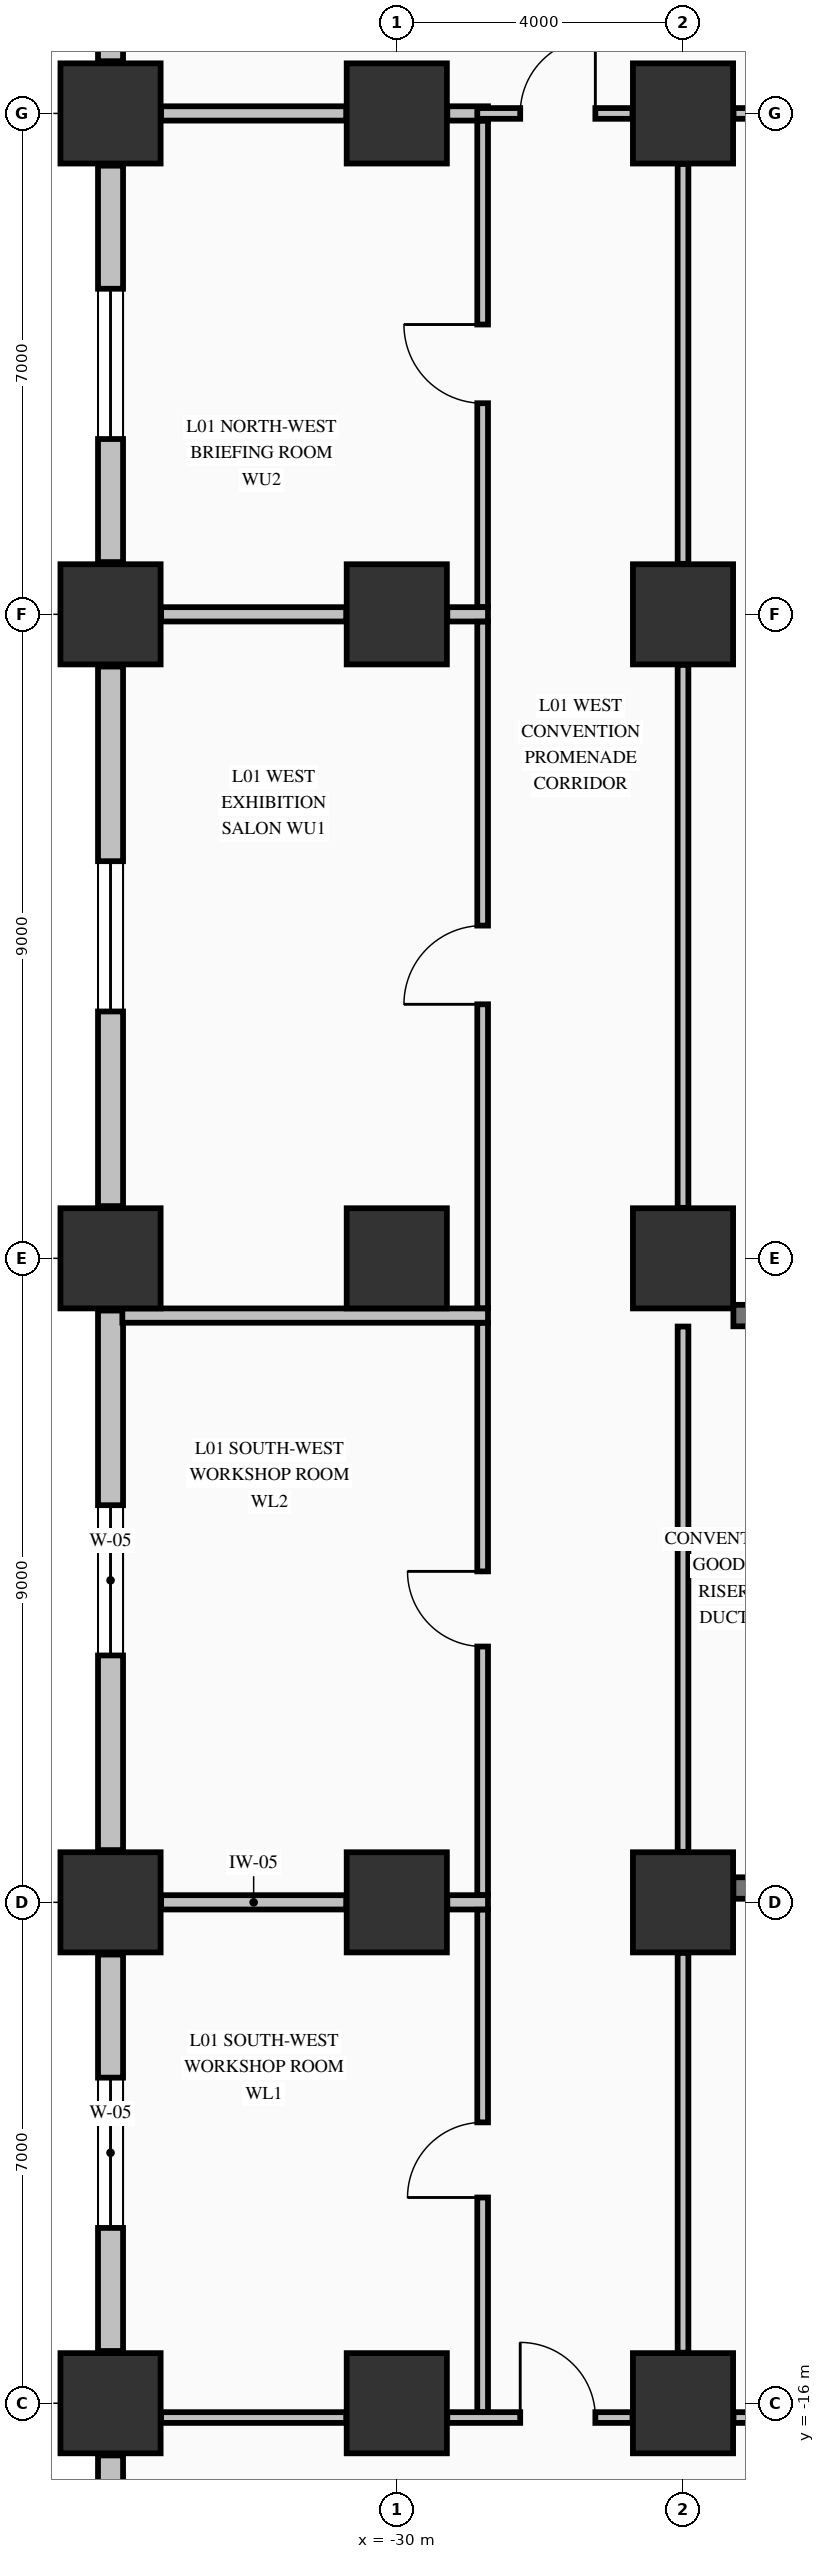
"""IFC4 building model, lengths in metres.
Left out: names, types, materials, properties, quantities, classifications, styles, units other than length and angle.
Written with IfcOpenShell. Run it as: python <this file> out.ifc"""

import sys

from ifc_helpers import new_model, si_unit, direction, frame, frame_2d, origin, origin_2d, place, context, subcontext, project, spatial, rectangle, extrude, element, fill, save


model = new_model("IFC4")
c1 = context("Model", 3, precision=1e-05, world=origin(), true_north=direction((0.0, 1.0)))
c2 = subcontext(c1, "Body", "Model", "MODEL_VIEW")
j1 = project(units=[si_unit("LENGTHUNIT", "METRE"), si_unit("PLANEANGLEUNIT", "RADIAN")], contexts=[c1])
p1 = place(None, origin())
s1 = spatial("IfcSite", under=j1, at=p1, CompositionType="ELEMENT")
p2 = place(p1, origin())
s2 = spatial("IfcBuilding", under=s1, at=p2, CompositionType="ELEMENT")
p3 = place(p2, frame((0.0, 0.0, 5.44)))
s3 = spatial("IfcBuildingStorey", under=s2, at=p3, CompositionType="ELEMENT", Elevation=5.44)
for number, where, z_axis, x_axis in (
    (1, (-34.0, -16.0, 0.0), (0.0, 0.0, 1.0), (1.0, 0.0, 0.0)),
    (2, (-34.0, -9.0, 0.0), (0.0, 0.0, 1.0), (1.0, 0.0, 0.0)),
    (3, (-34.0, 0.0, 0.0), (0.0, 0.0, 1.0), (1.0, 0.0, 0.0)),
    (4, (-34.0, 9.0, 0.0), (0.0, 0.0, 1.0), (1.0, 0.0, 0.0)),
    (5, (-34.0, 16.0, 0.0), (0.0, 0.0, 1.0), (1.0, 0.0, 0.0)),
    (6, (-30.0, -16.0, 0.0), (0.0, 0.0, 1.0), (1.0, 0.0, 0.0)),
    (7, (-30.0, -9.0, 0.0), (0.0, 0.0, 1.0), (1.0, 0.0, 0.0)),
    (8, (-30.0, 0.0, 0.0), (0.0, 0.0, 1.0), (1.0, 0.0, 0.0)),
    (9, (-30.0, 9.0, 0.0), (0.0, 0.0, 1.0), (1.0, 0.0, 0.0)),
    (10, (-30.0, 16.0, 0.0), (0.0, 0.0, 1.0), (1.0, 0.0, 0.0)),
    (11, (-26.0, -16.0, 0.0), (0.0, 0.0, 1.0), (1.0, 0.0, 0.0)),
    (12, (-26.0, -9.0, 0.0), (0.0, 0.0, 1.0), (1.0, 0.0, 0.0)),
    (13, (-26.0, 0.0, 0.0), (0.0, 0.0, 1.0), (1.0, 0.0, 0.0)),
    (14, (-26.0, 9.0, 0.0), (0.0, 0.0, 1.0), (1.0, 0.0, 0.0)),
    (15, (-26.0, 16.0, 0.0), (0.0, 0.0, 1.0), (1.0, 0.0, 0.0)),
):
    element("IfcColumn", number, at=place(p3, frame(where, z_axis=z_axis, x_axis=x_axis)), inside=s3, PredefinedType="COLUMN", context=c2, shape_type="SweptSolid", body=[
        extrude(rectangle(XDim=1.4, YDim=1.4, at=origin_2d()), origin(), (0.0, 0.0, 1.0), 5.09),
    ])
p4 = place(p3, frame((-34.0, -21.27, 0.0), z_axis=(0.0, 0.0, 1.0), x_axis=(0.0, 1.0, 0.0)))
e16 = element("IfcWall", 16, at=p4, inside=s3, PredefinedType="STANDARD", context=c2, shape_type="SweptSolid", body=[
    extrude(rectangle(XDim=4.54, YDim=0.35, at=frame_2d((2.27, 0.0))), origin(), (0.0, 0.0, 1.0), 5.09),
])
p5 = place(p3, frame((-34.0, -15.27, 0.0), z_axis=(0.0, 0.0, 1.0), x_axis=(0.0, 1.0, 0.0)))
e17 = element("IfcWall", 17, at=p5, inside=s3, PredefinedType="STANDARD", context=c2, shape_type="SweptSolid", body=[
    extrude(rectangle(XDim=5.54, YDim=0.35, at=frame_2d((2.77, 0.0))), origin(), (0.0, 0.0, 1.0), 4.482),
])
p6 = place(p5, frame((1.72, 0.0, 0.75)))
e18 = element("IfcOpeningElement", 18, at=p6, cuts=e17, PredefinedType="OPENING", context=c2, shape_type="SweptSolid", body=[
    extrude(rectangle(XDim=2.1, YDim=1.75, at=frame_2d((1.05, 0.875))), frame((0.0, 0.185, 0.0), z_axis=(0.0, -1.0, 0.0), x_axis=(1.0, 0.0, 0.0)), (0.0, 0.0, 1.0), 0.37),
])
p7 = place(p3, frame((-34.0, -8.27, 0.0), z_axis=(0.0, 0.0, 1.0), x_axis=(0.0, 1.0, 0.0)))
e19 = element("IfcWall", 19, at=p7, inside=s3, PredefinedType="STANDARD", context=c2, shape_type="SweptSolid", body=[
    extrude(rectangle(XDim=7.54, YDim=0.35, at=frame_2d((3.77, 0.0))), origin(), (0.0, 0.0, 1.0), 4.482),
])
p8 = place(p7, frame((2.72, 0.0, 0.75)))
e20 = element("IfcOpeningElement", 20, at=p8, cuts=e19, PredefinedType="OPENING", context=c2, shape_type="SweptSolid", body=[
    extrude(rectangle(XDim=2.1, YDim=1.75, at=frame_2d((1.05, 0.875))), frame((0.0, 0.185, 0.0), z_axis=(0.0, -1.0, 0.0), x_axis=(1.0, 0.0, 0.0)), (0.0, 0.0, 1.0), 0.37),
])
p9 = place(p3, frame((-34.0, 0.73, 0.0), z_axis=(0.0, 0.0, 1.0), x_axis=(0.0, 1.0, 0.0)))
e21 = element("IfcWall", 21, at=p9, inside=s3, PredefinedType="STANDARD", context=c2, shape_type="SweptSolid", body=[
    extrude(rectangle(XDim=7.54, YDim=0.35, at=frame_2d((3.77, 0.0))), origin(), (0.0, 0.0, 1.0), 4.482),
])
p10 = place(p9, frame((2.72, 0.0, 0.75)))
e22 = element("IfcOpeningElement", 22, at=p10, cuts=e21, PredefinedType="OPENING", context=c2, shape_type="SweptSolid", body=[
    extrude(rectangle(XDim=2.1, YDim=1.75, at=frame_2d((1.05, 0.875))), frame((0.0, 0.185, 0.0), z_axis=(0.0, -1.0, 0.0), x_axis=(1.0, 0.0, 0.0)), (0.0, 0.0, 1.0), 0.37),
])
p11 = place(p3, frame((-34.0, 9.73, 0.0), z_axis=(0.0, 0.0, 1.0), x_axis=(0.0, 1.0, 0.0)))
e23 = element("IfcWall", 23, at=p11, inside=s3, PredefinedType="STANDARD", context=c2, shape_type="SweptSolid", body=[
    extrude(rectangle(XDim=5.54, YDim=0.35, at=frame_2d((2.77, 0.0))), origin(), (0.0, 0.0, 1.0), 4.482),
])
p12 = place(p11, frame((1.72, 0.0, 0.75)))
e24 = element("IfcOpeningElement", 24, at=p12, cuts=e23, PredefinedType="OPENING", context=c2, shape_type="SweptSolid", body=[
    extrude(rectangle(XDim=2.1, YDim=1.75, at=frame_2d((1.05, 0.875))), frame((0.0, 0.185, 0.0), z_axis=(0.0, -1.0, 0.0), x_axis=(1.0, 0.0, 0.0)), (0.0, 0.0, 1.0), 0.37),
])
p13 = place(p3, frame((-34.0, 16.73, 0.0), z_axis=(0.0, 0.0, 1.0), x_axis=(0.0, 1.0, 0.0)))
e25 = element("IfcWall", 25, at=p13, inside=s3, PredefinedType="STANDARD", context=c2, shape_type="SweptSolid", body=[
    extrude(rectangle(XDim=4.54, YDim=0.35, at=frame_2d((2.27, 0.0))), origin(), (0.0, 0.0, 1.0), 4.482),
])
for number, where, z_axis, x_axis in (
    (26, (-25.296, -8.8, 0.0), (0.0, 0.0, 1.0), (1.0, 0.0, 0.0)),
    (27, (-25.296, -0.8, 0.0), (0.0, 0.0, 1.0), (1.0, 0.0, 0.0)),
):
    element("IfcWall", number, at=place(p3, frame(where, z_axis=z_axis, x_axis=x_axis)), inside=s3, PredefinedType="SHEAR", context=c2, shape_type="SweptSolid", body=[
        extrude(rectangle(XDim=3.046, YDim=0.3, at=frame_2d((1.523, 0.0))), origin(), (0.0, 0.0, 1.0), 5.09),
    ])
p14 = place(p3, frame((-33.294, -16.2, 0.0), z_axis=(0.0, 0.0, 1.0), x_axis=(1.0, 0.0, 0.0)))
e28 = element("IfcWall", 28, at=p14, inside=s3, PredefinedType="PARTITIONING", context=c2, shape_type="SweptSolid", body=[
    extrude(rectangle(XDim=2.588, YDim=0.15, at=frame_2d((1.294, 0.0))), origin(), (0.0, 0.0, 1.0), 4.132),
])
p15 = place(p3, frame((-29.294, -16.2, 0.0), z_axis=(0.0, 0.0, 1.0), x_axis=(1.0, 0.0, 0.0)))
e29 = element("IfcWall", 29, at=p15, inside=s3, PredefinedType="PARTITIONING", context=c2, shape_type="SweptSolid", body=[
    extrude(rectangle(XDim=2.588, YDim=0.15, at=frame_2d((1.294, 0.0))), origin(), (0.0, 0.0, 1.0), 4.132),
])
p16 = place(p15, frame((1.019, 0.0, 0.0)))
e30 = element("IfcOpeningElement", 30, at=p16, cuts=e29, PredefinedType="OPENING", context=c2, shape_type="SweptSolid", body=[
    extrude(rectangle(XDim=1.05, YDim=2.15, at=frame_2d((0.525, 1.075))), frame((0.0, 0.085, 0.0), z_axis=(0.0, -1.0, 0.0), x_axis=(1.0, 0.0, 0.0)), (0.0, 0.0, 1.0), 0.17),
])
p17 = place(p3, frame((-25.294, -16.2, 0.0), z_axis=(0.0, 0.0, 1.0), x_axis=(1.0, 0.0, 0.0)))
e31 = element("IfcWall", 31, at=p17, inside=s3, PredefinedType="PARTITIONING", context=c2, shape_type="SweptSolid", body=[
    extrude(rectangle(XDim=4.488, YDim=0.15, at=frame_2d((2.244, 0.0))), origin(), (0.0, 0.0, 1.0), 4.132),
])
p18 = place(p17, frame((0.619, 0.0, 0.0)))
e32 = element("IfcOpeningElement", 32, at=p18, cuts=e31, PredefinedType="OPENING", context=c2, shape_type="SweptSolid", body=[
    extrude(rectangle(XDim=0.95, YDim=2.15, at=frame_2d((0.475, 1.075))), frame((0.0, 0.085, 0.0), z_axis=(0.0, -1.0, 0.0), x_axis=(1.0, 0.0, 0.0)), (0.0, 0.0, 1.0), 0.17),
])
p19 = place(p3, frame((-33.294, -9.0, 0.0), z_axis=(0.0, 0.0, 1.0), x_axis=(1.0, 0.0, 0.0)))
e33 = element("IfcWall", 33, at=p19, inside=s3, PredefinedType="PARTITIONING", context=c2, shape_type="SweptSolid", body=[
    extrude(rectangle(XDim=2.588, YDim=0.2, at=frame_2d((1.294, 0.0))), origin(), (0.0, 0.0, 1.0), 4.132),
])
p20 = place(p3, frame((-29.294, -9.0, 0.0), z_axis=(0.0, 0.0, 1.0), x_axis=(1.0, 0.0, 0.0)))
e34 = element("IfcWall", 34, at=p20, inside=s3, PredefinedType="PARTITIONING", context=c2, shape_type="SweptSolid", body=[
    extrude(rectangle(XDim=0.569, YDim=0.2, at=frame_2d((0.284, 0.0))), origin(), (0.0, 0.0, 1.0), 4.132),
])
p21 = place(p3, frame((-33.835, -0.8, 0.0), z_axis=(0.0, 0.0, 1.0), x_axis=(1.0, 0.0, 0.0)))
e35 = element("IfcWall", 35, at=p21, inside=s3, PredefinedType="PARTITIONING", context=c2, shape_type="SweptSolid", body=[
    extrude(rectangle(XDim=5.11, YDim=0.2, at=frame_2d((2.555, 0.0))), origin(), (0.0, 0.0, 1.0), 5.09),
])
p22 = place(p3, frame((-33.294, 9.0, 0.0), z_axis=(0.0, 0.0, 1.0), x_axis=(1.0, 0.0, 0.0)))
e36 = element("IfcWall", 36, at=p22, inside=s3, PredefinedType="PARTITIONING", context=c2, shape_type="SweptSolid", body=[
    extrude(rectangle(XDim=2.588, YDim=0.2, at=frame_2d((1.294, 0.0))), origin(), (0.0, 0.0, 1.0), 4.132),
])
p23 = place(p3, frame((-29.294, 9.0, 0.0), z_axis=(0.0, 0.0, 1.0), x_axis=(1.0, 0.0, 0.0)))
e37 = element("IfcWall", 37, at=p23, inside=s3, PredefinedType="PARTITIONING", context=c2, shape_type="SweptSolid", body=[
    extrude(rectangle(XDim=0.569, YDim=0.2, at=frame_2d((0.284, 0.0))), origin(), (0.0, 0.0, 1.0), 4.132),
])
p24 = place(p3, frame((-33.294, 16.0, 0.0), z_axis=(0.0, 0.0, 1.0), x_axis=(1.0, 0.0, 0.0)))
e38 = element("IfcWall", 38, at=p24, inside=s3, PredefinedType="PARTITIONING", context=c2, shape_type="SweptSolid", body=[
    extrude(rectangle(XDim=2.588, YDim=0.2, at=frame_2d((1.294, 0.0))), origin(), (0.0, 0.0, 1.0), 4.132),
])
p25 = place(p3, frame((-29.294, 16.0, 0.0), z_axis=(0.0, 0.0, 1.0), x_axis=(1.0, 0.0, 0.0)))
e39 = element("IfcWall", 39, at=p25, inside=s3, PredefinedType="PARTITIONING", context=c2, shape_type="SweptSolid", body=[
    extrude(rectangle(XDim=0.569, YDim=0.2, at=frame_2d((0.284, 0.0))), origin(), (0.0, 0.0, 1.0), 4.132),
])
p26 = place(p3, frame((-28.875, 16.0, 0.0), z_axis=(0.0, 0.0, 1.0), x_axis=(1.0, 0.0, 0.0)))
e40 = element("IfcWall", 40, at=p26, inside=s3, PredefinedType="PARTITIONING", context=c2, shape_type="SweptSolid", body=[
    extrude(rectangle(XDim=2.169, YDim=0.15, at=frame_2d((1.084, 0.0))), origin(), (0.0, 0.0, 1.0), 4.132),
])
p27 = place(p26, frame((0.6, 0.0, 0.0)))
e41 = element("IfcOpeningElement", 41, at=p27, cuts=e40, PredefinedType="OPENING", context=c2, shape_type="SweptSolid", body=[
    extrude(rectangle(XDim=1.05, YDim=2.15, at=frame_2d((0.525, 1.075))), frame((0.0, 0.085, 0.0), z_axis=(0.0, -1.0, 0.0), x_axis=(1.0, 0.0, 0.0)), (0.0, 0.0, 1.0), 0.17),
])
p28 = place(p3, frame((-25.294, 16.0, 0.0), z_axis=(0.0, 0.0, 1.0), x_axis=(1.0, 0.0, 0.0)))
e42 = element("IfcWall", 42, at=p28, inside=s3, PredefinedType="PARTITIONING", context=c2, shape_type="SweptSolid", body=[
    extrude(rectangle(XDim=4.488, YDim=0.15, at=frame_2d((2.244, 0.0))), origin(), (0.0, 0.0, 1.0), 4.132),
])
p29 = place(p28, frame((3.238, 0.0, 0.0)))
e43 = element("IfcOpeningElement", 43, at=p29, cuts=e42, PredefinedType="OPENING", context=c2, shape_type="SweptSolid", body=[
    extrude(rectangle(XDim=1.1, YDim=2.15, at=frame_2d((0.55, 1.075))), frame((0.0, 0.085, 0.0), z_axis=(0.0, -1.0, 0.0), x_axis=(1.0, 0.0, 0.0)), (0.0, 0.0, 1.0), 0.17),
])
p30 = place(p3, frame((-28.8, -16.122, 0.0), z_axis=(0.0, 0.0, 1.0), x_axis=(0.0, 1.0, 0.0)))
e44 = element("IfcWall", 44, at=p30, inside=s3, PredefinedType="PARTITIONING", context=c2, shape_type="SweptSolid", body=[
    extrude(rectangle(XDim=7.019, YDim=0.15, at=frame_2d((3.51, 0.0))), origin(), (0.0, 0.0, 1.0), 5.09),
])
p31 = place(p30, frame((2.997, 0.0, 0.0)))
e45 = element("IfcOpeningElement", 45, at=p31, cuts=e44, PredefinedType="OPENING", context=c2, shape_type="SweptSolid", body=[
    extrude(rectangle(XDim=1.05, YDim=2.15, at=frame_2d((0.525, 1.075))), frame((0.0, 0.085, 0.0), z_axis=(0.0, -1.0, 0.0), x_axis=(1.0, 0.0, 0.0)), (0.0, 0.0, 1.0), 0.17),
])
p32 = place(p3, frame((-28.8, -8.897, 0.0), z_axis=(0.0, 0.0, 1.0), x_axis=(0.0, 1.0, 0.0)))
e46 = element("IfcWall", 46, at=p32, inside=s3, PredefinedType="PARTITIONING", context=c2, shape_type="SweptSolid", body=[
    extrude(rectangle(XDim=7.994, YDim=0.15, at=frame_2d((3.997, 0.0))), origin(), (0.0, 0.0, 1.0), 5.09),
])
p33 = place(p32, frame((3.472, 0.0, 0.0)))
e47 = element("IfcOpeningElement", 47, at=p33, cuts=e46, PredefinedType="OPENING", context=c2, shape_type="SweptSolid", body=[
    extrude(rectangle(XDim=1.05, YDim=2.15, at=frame_2d((0.525, 1.075))), frame((0.0, 0.085, 0.0), z_axis=(0.0, -1.0, 0.0), x_axis=(1.0, 0.0, 0.0)), (0.0, 0.0, 1.0), 0.17),
])
p34 = place(p3, frame((-28.8, -0.697, 0.0), z_axis=(0.0, 0.0, 1.0), x_axis=(0.0, 1.0, 0.0)))
e48 = element("IfcWall", 48, at=p34, inside=s3, PredefinedType="PARTITIONING", context=c2, shape_type="SweptSolid", body=[
    extrude(rectangle(XDim=9.594, YDim=0.15, at=frame_2d((4.797, 0.0))), origin(), (0.0, 0.0, 1.0), 5.09),
])
p35 = place(p34, frame((4.247, 0.0, 0.0)))
e49 = element("IfcOpeningElement", 49, at=p35, cuts=e48, PredefinedType="OPENING", context=c2, shape_type="SweptSolid", body=[
    extrude(rectangle(XDim=1.1, YDim=2.15, at=frame_2d((0.55, 1.075))), frame((0.0, 0.085, 0.0), z_axis=(0.0, -1.0, 0.0), x_axis=(1.0, 0.0, 0.0)), (0.0, 0.0, 1.0), 0.17),
])
p36 = place(p3, frame((-28.8, 9.103, 0.0), z_axis=(0.0, 0.0, 1.0), x_axis=(0.0, 1.0, 0.0)))
e50 = element("IfcWall", 50, at=p36, inside=s3, PredefinedType="PARTITIONING", context=c2, shape_type="SweptSolid", body=[
    extrude(rectangle(XDim=6.794, YDim=0.15, at=frame_2d((3.397, 0.0))), origin(), (0.0, 0.0, 1.0), 5.09),
])
p37 = place(p36, frame((2.847, 0.0, 0.0)))
e51 = element("IfcOpeningElement", 51, at=p37, cuts=e50, PredefinedType="OPENING", context=c2, shape_type="SweptSolid", body=[
    extrude(rectangle(XDim=1.1, YDim=2.15, at=frame_2d((0.55, 1.075))), frame((0.0, 0.085, 0.0), z_axis=(0.0, -1.0, 0.0), x_axis=(1.0, 0.0, 0.0)), (0.0, 0.0, 1.0), 0.17),
])
p38 = place(p3, frame((-26.0, -15.294, 0.0), z_axis=(0.0, 0.0, 1.0), x_axis=(0.0, 1.0, 0.0)))
e52 = element("IfcWall", 52, at=p38, inside=s3, PredefinedType="PARTITIONING", context=c2, shape_type="SweptSolid", body=[
    extrude(rectangle(XDim=5.588, YDim=0.15, at=frame_2d((2.794, 0.0))), origin(), (0.0, 0.0, 1.0), 4.132),
])
p39 = place(p3, frame((-26.0, -8.294, 0.0), z_axis=(0.0, 0.0, 1.0), x_axis=(0.0, 1.0, 0.0)))
e53 = element("IfcWall", 53, at=p39, inside=s3, PredefinedType="PARTITIONING", context=c2, shape_type="SweptSolid", body=[
    extrude(rectangle(XDim=7.341, YDim=0.15, at=frame_2d((3.67, 0.0))), origin(), (0.0, 0.0, 1.0), 4.132),
])
p40 = place(p3, frame((-26.0, 0.706, 0.0), z_axis=(0.0, 0.0, 1.0), x_axis=(0.0, 1.0, 0.0)))
e54 = element("IfcWall", 54, at=p40, inside=s3, PredefinedType="PARTITIONING", context=c2, shape_type="SweptSolid", body=[
    extrude(rectangle(XDim=7.588, YDim=0.15, at=frame_2d((3.794, 0.0))), origin(), (0.0, 0.0, 1.0), 4.132),
])
p41 = place(p3, frame((-26.0, 9.706, 0.0), z_axis=(0.0, 0.0, 1.0), x_axis=(0.0, 1.0, 0.0)))
e55 = element("IfcWall", 55, at=p41, inside=s3, PredefinedType="PARTITIONING", context=c2, shape_type="SweptSolid", body=[
    extrude(rectangle(XDim=5.588, YDim=0.15, at=frame_2d((2.794, 0.0))), origin(), (0.0, 0.0, 1.0), 4.132),
])
p42 = place(p6, origin())
e56 = element("IfcWindow", 56, at=p42, inside=s3, PartitioningType="SINGLE_PANEL", PredefinedType="WINDOW", context=c2, shape_type="SweptSolid", body=[
    extrude(rectangle(XDim=2.1, YDim=1.75, at=frame_2d((1.05, 0.875))), frame((0.0, 0.03, 0.0), z_axis=(0.0, -1.0, 0.0), x_axis=(1.0, 0.0, 0.0)), (0.0, 0.0, 1.0), 0.06),
])
fill(e18, e56)
p43 = place(p8, origin())
e57 = element("IfcWindow", 57, at=p43, inside=s3, PartitioningType="SINGLE_PANEL", PredefinedType="WINDOW", context=c2, shape_type="SweptSolid", body=[
    extrude(rectangle(XDim=2.1, YDim=1.75, at=frame_2d((1.05, 0.875))), frame((0.0, 0.03, 0.0), z_axis=(0.0, -1.0, 0.0), x_axis=(1.0, 0.0, 0.0)), (0.0, 0.0, 1.0), 0.06),
])
fill(e20, e57)
p44 = place(p10, origin())
e58 = element("IfcWindow", 58, at=p44, inside=s3, PartitioningType="SINGLE_PANEL", PredefinedType="WINDOW", context=c2, shape_type="SweptSolid", body=[
    extrude(rectangle(XDim=2.1, YDim=1.75, at=frame_2d((1.05, 0.875))), frame((0.0, 0.03, 0.0), z_axis=(0.0, -1.0, 0.0), x_axis=(1.0, 0.0, 0.0)), (0.0, 0.0, 1.0), 0.06),
])
fill(e22, e58)
p45 = place(p12, origin())
e59 = element("IfcWindow", 59, at=p45, inside=s3, PartitioningType="SINGLE_PANEL", PredefinedType="WINDOW", context=c2, shape_type="SweptSolid", body=[
    extrude(rectangle(XDim=2.1, YDim=1.75, at=frame_2d((1.05, 0.875))), frame((0.0, 0.03, 0.0), z_axis=(0.0, -1.0, 0.0), x_axis=(1.0, 0.0, 0.0)), (0.0, 0.0, 1.0), 0.06),
])
fill(e24, e59)
p46 = place(p16, origin())
e60 = element("IfcDoor", 60, at=p46, inside=s3, OperationType="SINGLE_SWING_LEFT", PredefinedType="DOOR", context=c2, shape_type="SweptSolid", body=[
    extrude(rectangle(XDim=1.05, YDim=2.15, at=frame_2d((0.525, 1.075))), frame((0.0, 0.025, 0.0), z_axis=(0.0, -1.0, 0.0), x_axis=(1.0, 0.0, 0.0)), (0.0, 0.0, 1.0), 0.05),
])
fill(e30, e60)
p47 = place(p27, origin())
e61 = element("IfcDoor", 61, at=p47, inside=s3, OperationType="SINGLE_SWING_RIGHT", PredefinedType="DOOR", context=c2, shape_type="SweptSolid", body=[
    extrude(rectangle(XDim=1.05, YDim=2.15, at=frame_2d((0.525, 1.075))), frame((0.0, 0.025, 0.0), z_axis=(0.0, -1.0, 0.0), x_axis=(1.0, 0.0, 0.0)), (0.0, 0.0, 1.0), 0.05),
])
fill(e41, e61)
p48 = place(p31, origin())
e62 = element("IfcDoor", 62, at=p48, inside=s3, OperationType="SINGLE_SWING_LEFT", PredefinedType="DOOR", context=c2, shape_type="SweptSolid", body=[
    extrude(rectangle(XDim=1.05, YDim=2.15, at=frame_2d((0.525, 1.075))), frame((0.0, 0.025, 0.0), z_axis=(0.0, -1.0, 0.0), x_axis=(1.0, 0.0, 0.0)), (0.0, 0.0, 1.0), 0.05),
])
fill(e45, e62)
p49 = place(p33, origin())
e63 = element("IfcDoor", 63, at=p49, inside=s3, OperationType="SINGLE_SWING_RIGHT", PredefinedType="DOOR", context=c2, shape_type="SweptSolid", body=[
    extrude(rectangle(XDim=1.05, YDim=2.15, at=frame_2d((0.525, 1.075))), frame((0.0, 0.025, 0.0), z_axis=(0.0, -1.0, 0.0), x_axis=(1.0, 0.0, 0.0)), (0.0, 0.0, 1.0), 0.05),
])
fill(e47, e63)
p50 = place(p35, origin())
e64 = element("IfcDoor", 64, at=p50, inside=s3, OperationType="SINGLE_SWING_LEFT", PredefinedType="DOOR", context=c2, shape_type="SweptSolid", body=[
    extrude(rectangle(XDim=1.1, YDim=2.15, at=frame_2d((0.55, 1.075))), frame((0.0, 0.025, 0.0), z_axis=(0.0, -1.0, 0.0), x_axis=(1.0, 0.0, 0.0)), (0.0, 0.0, 1.0), 0.05),
])
fill(e49, e64)
p51 = place(p37, origin())
e65 = element("IfcDoor", 65, at=p51, inside=s3, OperationType="SINGLE_SWING_RIGHT", PredefinedType="DOOR", context=c2, shape_type="SweptSolid", body=[
    extrude(rectangle(XDim=1.1, YDim=2.15, at=frame_2d((0.55, 1.075))), frame((0.0, 0.025, 0.0), z_axis=(0.0, -1.0, 0.0), x_axis=(1.0, 0.0, 0.0)), (0.0, 0.0, 1.0), 0.05),
])
fill(e51, e65)
save(model, sys.argv[1])
